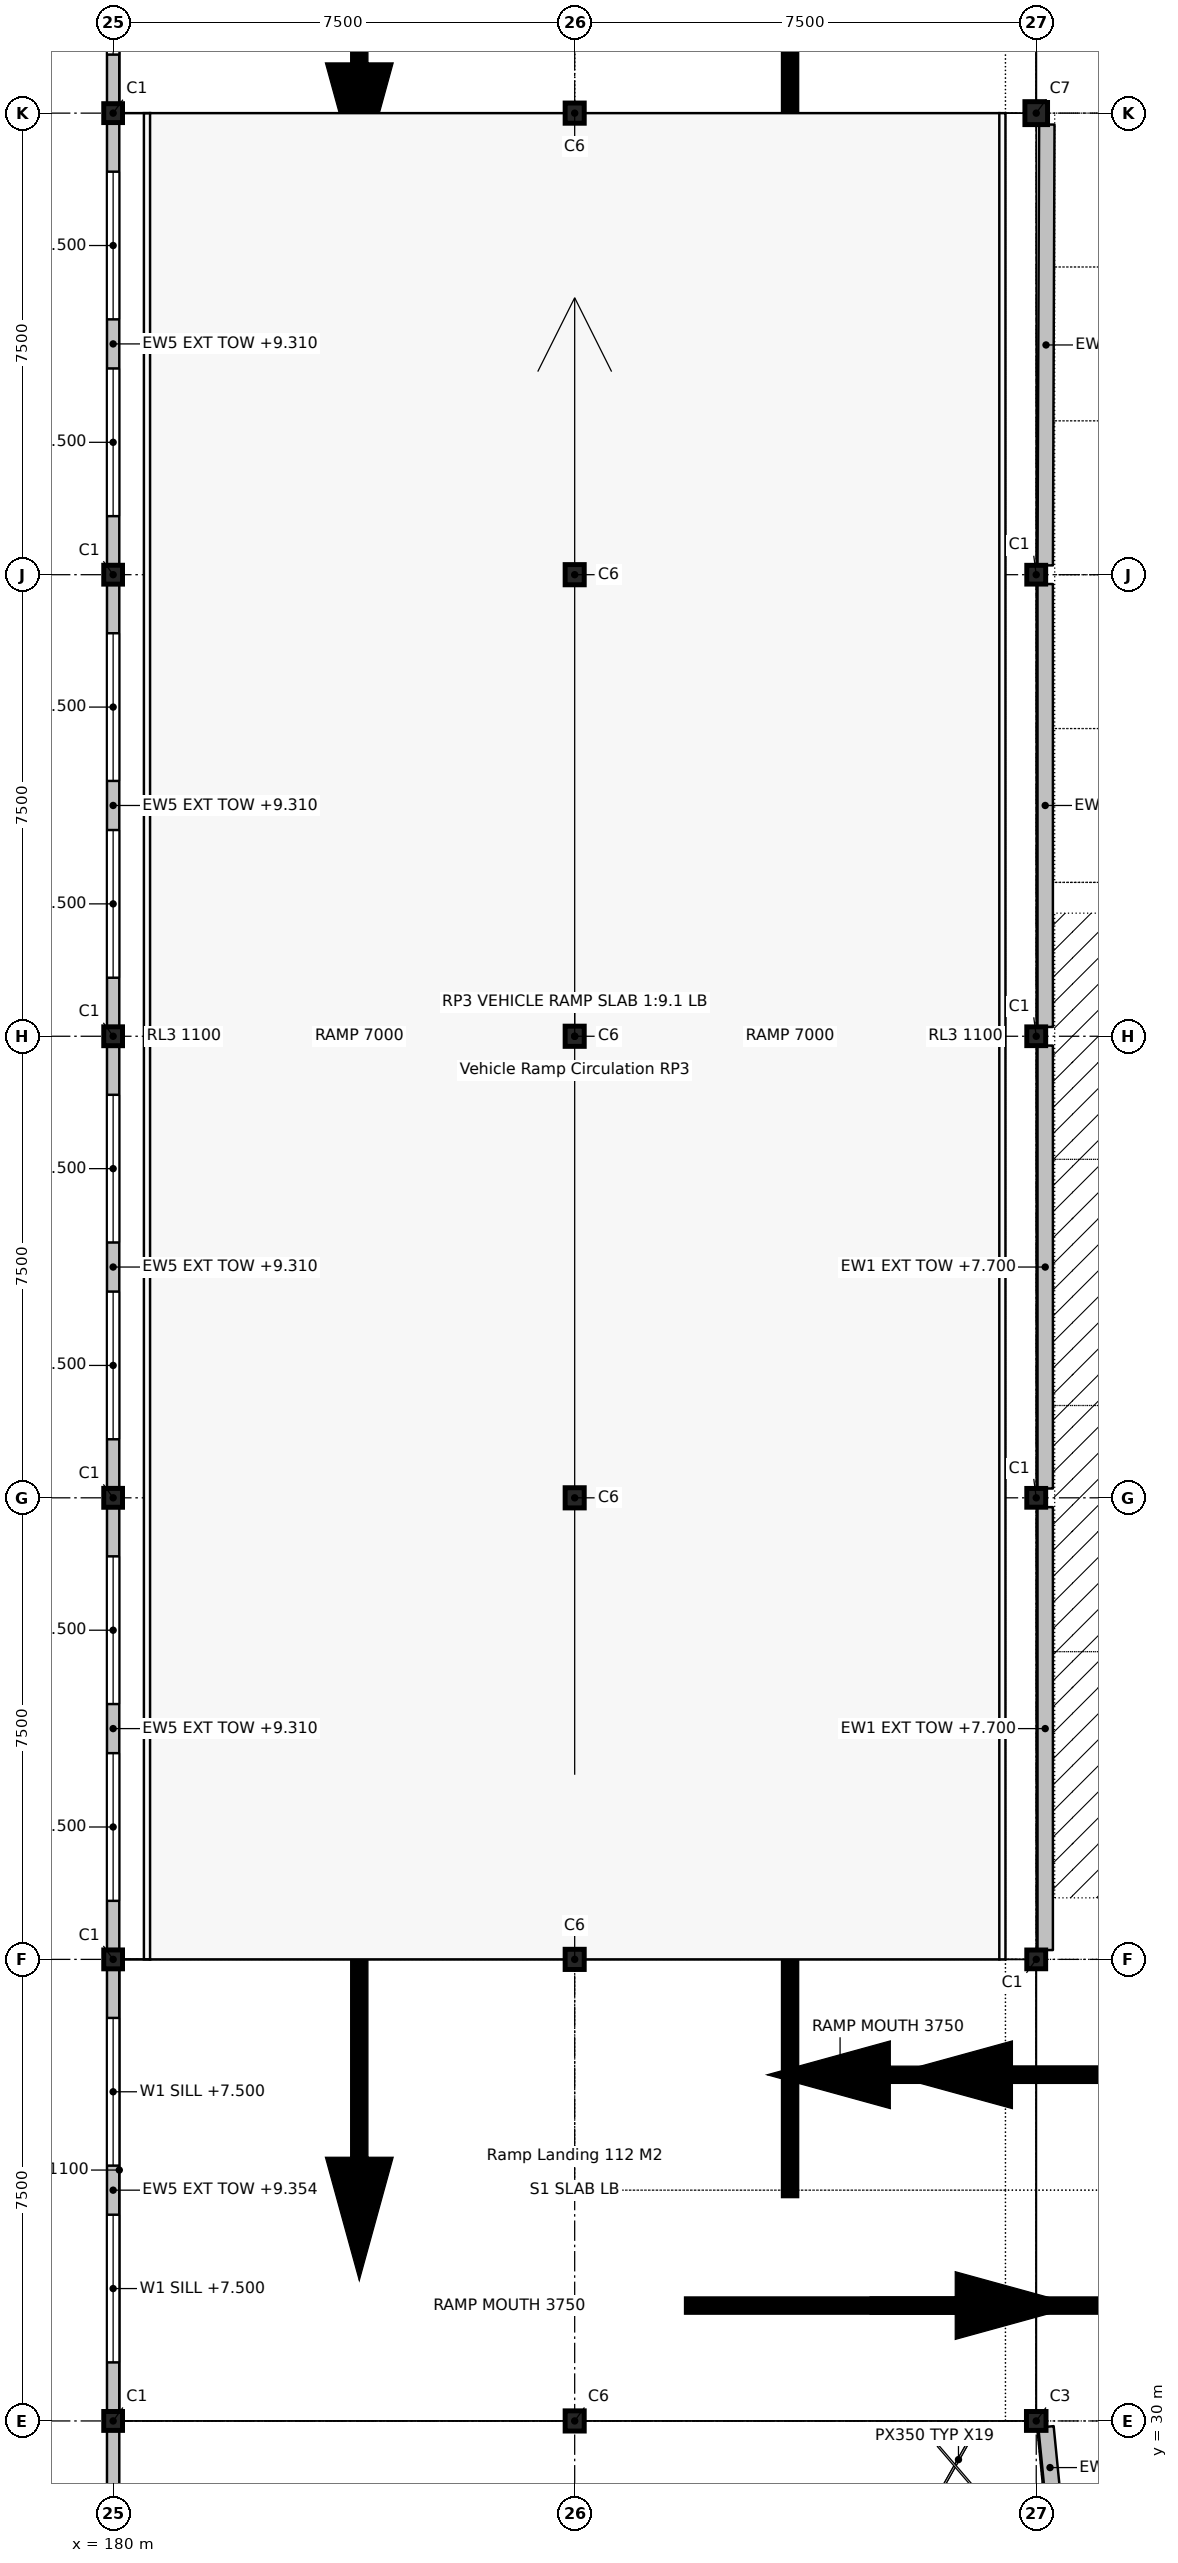
"""IFC4 building model, lengths in metres.
Left out: names, types, materials, properties, quantities, classifications, styles, units other than length and angle.
Written with IfcOpenShell. Run it as: python <this file> out.ifc"""

import sys

from ifc_helpers import new_model, si_unit, direction, frame, frame_2d, origin, origin_2d, place, context, subcontext, project, spatial, rectangle, i_section, extrude, element, fill, save


model = new_model("IFC4")
c1 = context("Model", 3, precision=1e-05, world=origin(), true_north=direction((0.0, 1.0)))
c2 = subcontext(c1, "Body", "Model", "MODEL_VIEW")
j1 = project(units=[si_unit("LENGTHUNIT", "METRE"), si_unit("PLANEANGLEUNIT", "RADIAN")], contexts=[c1])
p1 = place(None, origin())
s1 = spatial("IfcSite", under=j1, at=p1, CompositionType="ELEMENT")
p2 = place(p1, origin())
s2 = spatial("IfcBuilding", under=s1, at=p2, CompositionType="ELEMENT")
p3 = place(p2, frame((0.0, 0.0, 6.6)))
s3 = spatial("IfcBuildingStorey", under=s2, at=p3, CompositionType="ELEMENT", Elevation=6.6)
for number, where, z_axis, x_axis in (
    (1, (180.0, 30.0, 0.0), (0.0, 0.0, 1.0), (1.0, 0.0, 0.0)),
    (2, (180.0, 37.5, 0.0), (0.0, 0.0, 1.0), (1.0, 0.0, 0.0)),
    (3, (180.0, 45.0, 0.0), (0.0, 0.0, 1.0), (1.0, 0.0, 0.0)),
    (4, (180.0, 52.5, 0.0), (0.0, 0.0, 1.0), (1.0, 0.0, 0.0)),
    (5, (180.0, 60.0, 0.0), (0.0, 0.0, 1.0), (1.0, 0.0, 0.0)),
    (6, (180.0, 67.5, 0.0), (0.0, 0.0, 1.0), (1.0, 0.0, 0.0)),
):
    element("IfcColumn", number, at=place(p3, frame(where, z_axis=z_axis, x_axis=x_axis)), inside=s3, PredefinedType="COLUMN", context=c2, shape_type="SweptSolid", body=[
        extrude(i_section(OverallWidth=0.305, OverallDepth=0.307, WebThickness=0.01, FlangeThickness=0.015, FilletRadius=0.015, at=origin_2d()), origin(), (0.0, 0.0, 1.0), 3.3),
    ])
for number, where, z_axis, x_axis in (
    (7, (187.5, 30.0, 0.0), (0.0, 0.0, 1.0), (1.0, 0.0, 0.0)),
    (8, (187.5, 37.5, 0.0), (0.0, 0.0, 1.0), (1.0, 0.0, 0.0)),
    (9, (187.5, 45.0, 0.0), (0.0, 0.0, 1.0), (1.0, 0.0, 0.0)),
    (10, (187.5, 52.5, 0.0), (0.0, 0.0, 1.0), (1.0, 0.0, 0.0)),
    (11, (187.5, 60.0, 0.0), (0.0, 0.0, 1.0), (1.0, 0.0, 0.0)),
    (12, (187.5, 67.5, 0.0), (0.0, 0.0, 1.0), (1.0, 0.0, 0.0)),
):
    element("IfcColumn", number, at=place(p3, frame(where, z_axis=z_axis, x_axis=x_axis)), inside=s3, PredefinedType="COLUMN", context=c2, shape_type="SweptSolid", body=[
        extrude(i_section(OverallWidth=0.31, OverallDepth=0.328, WebThickness=0.015, FlangeThickness=0.025, FilletRadius=0.015, at=origin_2d()), origin(), (0.0, 0.0, 1.0), 3.3),
    ])
p4 = place(p3, frame((195.0, 67.5, 0.0), z_axis=(0.0, 0.0, 1.0), x_axis=(0.0, 1.0, 0.0)))
e13 = element("IfcColumn", 13, at=p4, inside=s3, PredefinedType="COLUMN", context=c2, shape_type="SweptSolid", body=[
    extrude(i_section(OverallWidth=0.373, OverallDepth=0.368, WebThickness=0.015, FlangeThickness=0.024, FilletRadius=0.015, at=origin_2d()), origin(), (0.0, 0.0, 1.0), 3.3),
])
for number, where, z_axis, x_axis in (
    (14, (195.0, 60.0, 0.0), (0.0, 0.0, 1.0), (0.0, 1.0, 0.0)),
    (15, (195.0, 52.5, 0.0), (0.0, 0.0, 1.0), (0.0, 1.0, 0.0)),
    (16, (195.0, 45.0, 0.0), (0.0, 0.0, 1.0), (0.0, 1.0, 0.0)),
    (17, (195.0, 37.5, 0.0), (0.0, 0.0, 1.0), (0.0, 1.0, 0.0)),
):
    element("IfcColumn", number, at=place(p3, frame(where, z_axis=z_axis, x_axis=x_axis)), inside=s3, PredefinedType="COLUMN", context=c2, shape_type="SweptSolid", body=[
        extrude(i_section(OverallWidth=0.305, OverallDepth=0.307, WebThickness=0.01, FlangeThickness=0.015, FilletRadius=0.015, at=origin_2d()), origin(), (0.0, 0.0, 1.0), 3.3),
    ])
p5 = place(p3, frame((195.0, 30.0, 0.0), z_axis=(0.0, 0.0, 1.0), x_axis=(0.0, 1.0, 0.0)))
e18 = element("IfcColumn", 18, at=p5, inside=s3, PredefinedType="COLUMN", context=c2, shape_type="SweptSolid", body=[
    extrude(i_section(OverallWidth=0.307, OverallDepth=0.318, WebThickness=0.013, FlangeThickness=0.021, FilletRadius=0.015, at=origin_2d()), origin(), (0.0, 0.0, 1.0), 3.3),
])
p6 = place(p3, frame((195.172, 67.314, 0.0), z_axis=(0.0, 0.0, 1.0), x_axis=(-0.003681082119, -0.999993224794, 0.0)))
e19 = element("IfcWall", 19, at=p6, inside=s3, PredefinedType="SOLIDWALL", context=c2, shape_type="SweptSolid", body=[
    extrude(rectangle(XDim=7.163, YDim=0.25, at=frame_2d((3.582, 0.0))), origin(), (0.0, 0.0, 1.0), 1.1),
])
for number, where, z_axis, x_axis in (
    (20, (195.146, 59.848, 0.0), (0.0, 0.0, 1.0), (0.0, -1.0, 0.0)),
    (21, (195.146, 52.348, 0.0), (0.0, 0.0, 1.0), (0.0, -1.0, 0.0)),
    (22, (195.146, 44.848, 0.0), (0.0, 0.0, 1.0), (0.0, -1.0, 0.0)),
):
    element("IfcWall", number, at=place(p3, frame(where, z_axis=z_axis, x_axis=x_axis)), inside=s3, PredefinedType="SOLIDWALL", context=c2, shape_type="SweptSolid", body=[
        extrude(rectangle(XDim=7.197, YDim=0.25, at=frame_2d((3.598, 0.0))), origin(), (0.0, 0.0, 1.0), 1.1),
    ])
p7 = place(p3, frame((195.159, 29.904, 0.0), z_axis=(0.0, 0.0, 1.0), x_axis=(0.098067173263, -0.995179797588, 0.0)))
e23 = element("IfcWall", 23, at=p7, inside=s3, PredefinedType="SOLIDWALL", context=c2, shape_type="SweptSolid", body=[
    extrude(rectangle(XDim=1.329, YDim=0.25, at=frame_2d((0.665, 0.0))), origin(), (0.0, 0.0, 1.0), 1.1),
])
p8 = place(p3, frame((180.0, 22.654, 0.0), z_axis=(0.0, 0.0, 1.0), x_axis=(0.0, 1.0, 0.0)))
e24 = element("IfcWall", 24, at=p8, inside=s3, PredefinedType="SOLIDWALL", context=c2, shape_type="SweptSolid", body=[
    extrude(rectangle(XDim=7.193, YDim=0.2, at=frame_2d((3.596, 0.0))), origin(), (0.0, 0.0, 1.0), 2.71),
])
p9 = place(p8, frame((1.098, 0.0, 1.1)))
e25 = element("IfcOpeningElement", 25, at=p9, cuts=e24, PredefinedType="OPENING", context=c2, shape_type="SweptSolid", body=[
    extrude(rectangle(XDim=1.8, YDim=1.4, at=frame_2d((0.9, 0.7))), frame((0.0, 0.11, 0.0), z_axis=(0.0, -1.0, 0.0), x_axis=(1.0, 0.0, 0.0)), (0.0, 0.0, 1.0), 0.22),
])
p10 = place(p8, frame((4.295, 0.0, 1.1)))
e26 = element("IfcOpeningElement", 26, at=p10, cuts=e24, PredefinedType="OPENING", context=c2, shape_type="SweptSolid", body=[
    extrude(rectangle(XDim=1.8, YDim=1.4, at=frame_2d((0.9, 0.7))), frame((0.0, 0.11, 0.0), z_axis=(0.0, -1.0, 0.0), x_axis=(1.0, 0.0, 0.0)), (0.0, 0.0, 1.0), 0.22),
])
p11 = place(p3, frame((180.0, 30.154, 0.0), z_axis=(0.0, 0.0, 1.0), x_axis=(0.0, 1.0, 0.0)))
e27 = element("IfcWall", 27, at=p11, inside=s3, PredefinedType="SOLIDWALL", context=c2, shape_type="SweptSolid", body=[
    extrude(rectangle(XDim=7.193, YDim=0.2, at=frame_2d((3.596, 0.0))), origin(), (0.0, 0.0, 1.0), 2.754),
])
p12 = place(p11, frame((0.798, 0.0, 0.9)))
e28 = element("IfcOpeningElement", 28, at=p12, cuts=e27, PredefinedType="OPENING", context=c2, shape_type="SweptSolid", body=[
    extrude(rectangle(XDim=2.4, YDim=1.5, at=frame_2d((1.2, 0.75))), frame((0.0, 0.11, 0.0), z_axis=(0.0, -1.0, 0.0), x_axis=(1.0, 0.0, 0.0)), (0.0, 0.0, 1.0), 0.22),
])
p13 = place(p11, frame((3.995, 0.0, 0.9)))
e29 = element("IfcOpeningElement", 29, at=p13, cuts=e27, PredefinedType="OPENING", context=c2, shape_type="SweptSolid", body=[
    extrude(rectangle(XDim=2.4, YDim=1.5, at=frame_2d((1.2, 0.75))), frame((0.0, 0.11, 0.0), z_axis=(0.0, -1.0, 0.0), x_axis=(1.0, 0.0, 0.0)), (0.0, 0.0, 1.0), 0.22),
])
p14 = place(p3, frame((180.0, 37.654, 0.0), z_axis=(0.0, 0.0, 1.0), x_axis=(0.0, 1.0, 0.0)))
e30 = element("IfcWall", 30, at=p14, inside=s3, PredefinedType="SOLIDWALL", context=c2, shape_type="SweptSolid", body=[
    extrude(rectangle(XDim=7.193, YDim=0.2, at=frame_2d((3.596, 0.0))), origin(), (0.0, 0.0, 1.0), 2.71),
])
p15 = place(p14, frame((0.798, 0.0, 0.9)))
e31 = element("IfcOpeningElement", 31, at=p15, cuts=e30, PredefinedType="OPENING", context=c2, shape_type="SweptSolid", body=[
    extrude(rectangle(XDim=2.4, YDim=1.5, at=frame_2d((1.2, 0.75))), frame((0.0, 0.11, 0.0), z_axis=(0.0, -1.0, 0.0), x_axis=(1.0, 0.0, 0.0)), (0.0, 0.0, 1.0), 0.22),
])
p16 = place(p14, frame((3.995, 0.0, 0.9)))
e32 = element("IfcOpeningElement", 32, at=p16, cuts=e30, PredefinedType="OPENING", context=c2, shape_type="SweptSolid", body=[
    extrude(rectangle(XDim=2.4, YDim=1.5, at=frame_2d((1.2, 0.75))), frame((0.0, 0.11, 0.0), z_axis=(0.0, -1.0, 0.0), x_axis=(1.0, 0.0, 0.0)), (0.0, 0.0, 1.0), 0.22),
])
p17 = place(p3, frame((180.0, 45.154, 0.0), z_axis=(0.0, 0.0, 1.0), x_axis=(0.0, 1.0, 0.0)))
e33 = element("IfcWall", 33, at=p17, inside=s3, PredefinedType="SOLIDWALL", context=c2, shape_type="SweptSolid", body=[
    extrude(rectangle(XDim=7.193, YDim=0.2, at=frame_2d((3.596, 0.0))), origin(), (0.0, 0.0, 1.0), 2.71),
])
p18 = place(p17, frame((0.798, 0.0, 0.9)))
e34 = element("IfcOpeningElement", 34, at=p18, cuts=e33, PredefinedType="OPENING", context=c2, shape_type="SweptSolid", body=[
    extrude(rectangle(XDim=2.4, YDim=1.5, at=frame_2d((1.2, 0.75))), frame((0.0, 0.11, 0.0), z_axis=(0.0, -1.0, 0.0), x_axis=(1.0, 0.0, 0.0)), (0.0, 0.0, 1.0), 0.22),
])
p19 = place(p17, frame((3.995, 0.0, 0.9)))
e35 = element("IfcOpeningElement", 35, at=p19, cuts=e33, PredefinedType="OPENING", context=c2, shape_type="SweptSolid", body=[
    extrude(rectangle(XDim=2.4, YDim=1.5, at=frame_2d((1.2, 0.75))), frame((0.0, 0.11, 0.0), z_axis=(0.0, -1.0, 0.0), x_axis=(1.0, 0.0, 0.0)), (0.0, 0.0, 1.0), 0.22),
])
p20 = place(p3, frame((180.0, 52.654, 0.0), z_axis=(0.0, 0.0, 1.0), x_axis=(0.0, 1.0, 0.0)))
e36 = element("IfcWall", 36, at=p20, inside=s3, PredefinedType="SOLIDWALL", context=c2, shape_type="SweptSolid", body=[
    extrude(rectangle(XDim=7.193, YDim=0.2, at=frame_2d((3.596, 0.0))), origin(), (0.0, 0.0, 1.0), 2.71),
])
p21 = place(p20, frame((0.798, 0.0, 0.9)))
e37 = element("IfcOpeningElement", 37, at=p21, cuts=e36, PredefinedType="OPENING", context=c2, shape_type="SweptSolid", body=[
    extrude(rectangle(XDim=2.4, YDim=1.5, at=frame_2d((1.2, 0.75))), frame((0.0, 0.11, 0.0), z_axis=(0.0, -1.0, 0.0), x_axis=(1.0, 0.0, 0.0)), (0.0, 0.0, 1.0), 0.22),
])
p22 = place(p20, frame((3.995, 0.0, 0.9)))
e38 = element("IfcOpeningElement", 38, at=p22, cuts=e36, PredefinedType="OPENING", context=c2, shape_type="SweptSolid", body=[
    extrude(rectangle(XDim=2.4, YDim=1.5, at=frame_2d((1.2, 0.75))), frame((0.0, 0.11, 0.0), z_axis=(0.0, -1.0, 0.0), x_axis=(1.0, 0.0, 0.0)), (0.0, 0.0, 1.0), 0.22),
])
p23 = place(p3, frame((180.0, 60.154, 0.0), z_axis=(0.0, 0.0, 1.0), x_axis=(0.0, 1.0, 0.0)))
e39 = element("IfcWall", 39, at=p23, inside=s3, PredefinedType="SOLIDWALL", context=c2, shape_type="SweptSolid", body=[
    extrude(rectangle(XDim=7.193, YDim=0.2, at=frame_2d((3.596, 0.0))), origin(), (0.0, 0.0, 1.0), 2.71),
])
p24 = place(p23, frame((0.798, 0.0, 0.9)))
e40 = element("IfcOpeningElement", 40, at=p24, cuts=e39, PredefinedType="OPENING", context=c2, shape_type="SweptSolid", body=[
    extrude(rectangle(XDim=2.4, YDim=1.5, at=frame_2d((1.2, 0.75))), frame((0.0, 0.11, 0.0), z_axis=(0.0, -1.0, 0.0), x_axis=(1.0, 0.0, 0.0)), (0.0, 0.0, 1.0), 0.22),
])
p25 = place(p23, frame((3.995, 0.0, 0.9)))
e41 = element("IfcOpeningElement", 41, at=p25, cuts=e39, PredefinedType="OPENING", context=c2, shape_type="SweptSolid", body=[
    extrude(rectangle(XDim=2.4, YDim=1.5, at=frame_2d((1.2, 0.75))), frame((0.0, 0.11, 0.0), z_axis=(0.0, -1.0, 0.0), x_axis=(1.0, 0.0, 0.0)), (0.0, 0.0, 1.0), 0.22),
])
p26 = place(p3, frame((180.0, 67.654, 0.0), z_axis=(0.0, 0.0, 1.0), x_axis=(0.0, 1.0, 0.0)))
e42 = element("IfcWall", 42, at=p26, inside=s3, PredefinedType="SOLIDWALL", context=c2, shape_type="SweptSolid", body=[
    extrude(rectangle(XDim=7.193, YDim=0.2, at=frame_2d((3.596, 0.0))), origin(), (0.0, 0.0, 1.0), 2.754),
])
p27 = place(p26, frame((0.798, 0.0, 0.9)))
e43 = element("IfcOpeningElement", 43, at=p27, cuts=e42, PredefinedType="OPENING", context=c2, shape_type="SweptSolid", body=[
    extrude(rectangle(XDim=2.4, YDim=1.5, at=frame_2d((1.2, 0.75))), frame((0.0, 0.11, 0.0), z_axis=(0.0, -1.0, 0.0), x_axis=(1.0, 0.0, 0.0)), (0.0, 0.0, 1.0), 0.22),
])
p28 = place(p26, frame((3.995, 0.0, 0.9)))
e44 = element("IfcOpeningElement", 44, at=p28, cuts=e42, PredefinedType="OPENING", context=c2, shape_type="SweptSolid", body=[
    extrude(rectangle(XDim=2.4, YDim=1.5, at=frame_2d((1.2, 0.75))), frame((0.0, 0.11, 0.0), z_axis=(0.0, -1.0, 0.0), x_axis=(1.0, 0.0, 0.0)), (0.0, 0.0, 1.0), 0.22),
])
p29 = place(p12, origin())
e45 = element("IfcWindow", 45, at=p29, inside=s3, PartitioningType="DOUBLE_PANEL_VERTICAL", PredefinedType="WINDOW", context=c2, shape_type="SweptSolid", body=[
    extrude(rectangle(XDim=2.4, YDim=1.5, at=frame_2d((1.2, 0.75))), frame((0.0, 0.03, 0.0), z_axis=(0.0, -1.0, 0.0), x_axis=(1.0, 0.0, 0.0)), (0.0, 0.0, 1.0), 0.06),
])
fill(e28, e45)
p30 = place(p13, origin())
e46 = element("IfcWindow", 46, at=p30, inside=s3, PartitioningType="DOUBLE_PANEL_VERTICAL", PredefinedType="WINDOW", context=c2, shape_type="SweptSolid", body=[
    extrude(rectangle(XDim=2.4, YDim=1.5, at=frame_2d((1.2, 0.75))), frame((0.0, 0.03, 0.0), z_axis=(0.0, -1.0, 0.0), x_axis=(1.0, 0.0, 0.0)), (0.0, 0.0, 1.0), 0.06),
])
fill(e29, e46)
p31 = place(p15, origin())
e47 = element("IfcWindow", 47, at=p31, inside=s3, PartitioningType="DOUBLE_PANEL_VERTICAL", PredefinedType="WINDOW", context=c2, shape_type="SweptSolid", body=[
    extrude(rectangle(XDim=2.4, YDim=1.5, at=frame_2d((1.2, 0.75))), frame((0.0, 0.03, 0.0), z_axis=(0.0, -1.0, 0.0), x_axis=(1.0, 0.0, 0.0)), (0.0, 0.0, 1.0), 0.06),
])
fill(e31, e47)
p32 = place(p16, origin())
e48 = element("IfcWindow", 48, at=p32, inside=s3, PartitioningType="DOUBLE_PANEL_VERTICAL", PredefinedType="WINDOW", context=c2, shape_type="SweptSolid", body=[
    extrude(rectangle(XDim=2.4, YDim=1.5, at=frame_2d((1.2, 0.75))), frame((0.0, 0.03, 0.0), z_axis=(0.0, -1.0, 0.0), x_axis=(1.0, 0.0, 0.0)), (0.0, 0.0, 1.0), 0.06),
])
fill(e32, e48)
p33 = place(p18, origin())
e49 = element("IfcWindow", 49, at=p33, inside=s3, PartitioningType="DOUBLE_PANEL_VERTICAL", PredefinedType="WINDOW", context=c2, shape_type="SweptSolid", body=[
    extrude(rectangle(XDim=2.4, YDim=1.5, at=frame_2d((1.2, 0.75))), frame((0.0, 0.03, 0.0), z_axis=(0.0, -1.0, 0.0), x_axis=(1.0, 0.0, 0.0)), (0.0, 0.0, 1.0), 0.06),
])
fill(e34, e49)
p34 = place(p19, origin())
e50 = element("IfcWindow", 50, at=p34, inside=s3, PartitioningType="DOUBLE_PANEL_VERTICAL", PredefinedType="WINDOW", context=c2, shape_type="SweptSolid", body=[
    extrude(rectangle(XDim=2.4, YDim=1.5, at=frame_2d((1.2, 0.75))), frame((0.0, 0.03, 0.0), z_axis=(0.0, -1.0, 0.0), x_axis=(1.0, 0.0, 0.0)), (0.0, 0.0, 1.0), 0.06),
])
fill(e35, e50)
p35 = place(p21, origin())
e51 = element("IfcWindow", 51, at=p35, inside=s3, PartitioningType="DOUBLE_PANEL_VERTICAL", PredefinedType="WINDOW", context=c2, shape_type="SweptSolid", body=[
    extrude(rectangle(XDim=2.4, YDim=1.5, at=frame_2d((1.2, 0.75))), frame((0.0, 0.03, 0.0), z_axis=(0.0, -1.0, 0.0), x_axis=(1.0, 0.0, 0.0)), (0.0, 0.0, 1.0), 0.06),
])
fill(e37, e51)
p36 = place(p22, origin())
e52 = element("IfcWindow", 52, at=p36, inside=s3, PartitioningType="DOUBLE_PANEL_VERTICAL", PredefinedType="WINDOW", context=c2, shape_type="SweptSolid", body=[
    extrude(rectangle(XDim=2.4, YDim=1.5, at=frame_2d((1.2, 0.75))), frame((0.0, 0.03, 0.0), z_axis=(0.0, -1.0, 0.0), x_axis=(1.0, 0.0, 0.0)), (0.0, 0.0, 1.0), 0.06),
])
fill(e38, e52)
p37 = place(p24, origin())
e53 = element("IfcWindow", 53, at=p37, inside=s3, PartitioningType="DOUBLE_PANEL_VERTICAL", PredefinedType="WINDOW", context=c2, shape_type="SweptSolid", body=[
    extrude(rectangle(XDim=2.4, YDim=1.5, at=frame_2d((1.2, 0.75))), frame((0.0, 0.03, 0.0), z_axis=(0.0, -1.0, 0.0), x_axis=(1.0, 0.0, 0.0)), (0.0, 0.0, 1.0), 0.06),
])
fill(e40, e53)
p38 = place(p25, origin())
e54 = element("IfcWindow", 54, at=p38, inside=s3, PartitioningType="DOUBLE_PANEL_VERTICAL", PredefinedType="WINDOW", context=c2, shape_type="SweptSolid", body=[
    extrude(rectangle(XDim=2.4, YDim=1.5, at=frame_2d((1.2, 0.75))), frame((0.0, 0.03, 0.0), z_axis=(0.0, -1.0, 0.0), x_axis=(1.0, 0.0, 0.0)), (0.0, 0.0, 1.0), 0.06),
])
fill(e41, e54)
p39 = place(p27, origin())
e55 = element("IfcWindow", 55, at=p39, inside=s3, PartitioningType="DOUBLE_PANEL_VERTICAL", PredefinedType="WINDOW", context=c2, shape_type="SweptSolid", body=[
    extrude(rectangle(XDim=2.4, YDim=1.5, at=frame_2d((1.2, 0.75))), frame((0.0, 0.03, 0.0), z_axis=(0.0, -1.0, 0.0), x_axis=(1.0, 0.0, 0.0)), (0.0, 0.0, 1.0), 0.06),
])
fill(e43, e55)
save(model, sys.argv[1])
